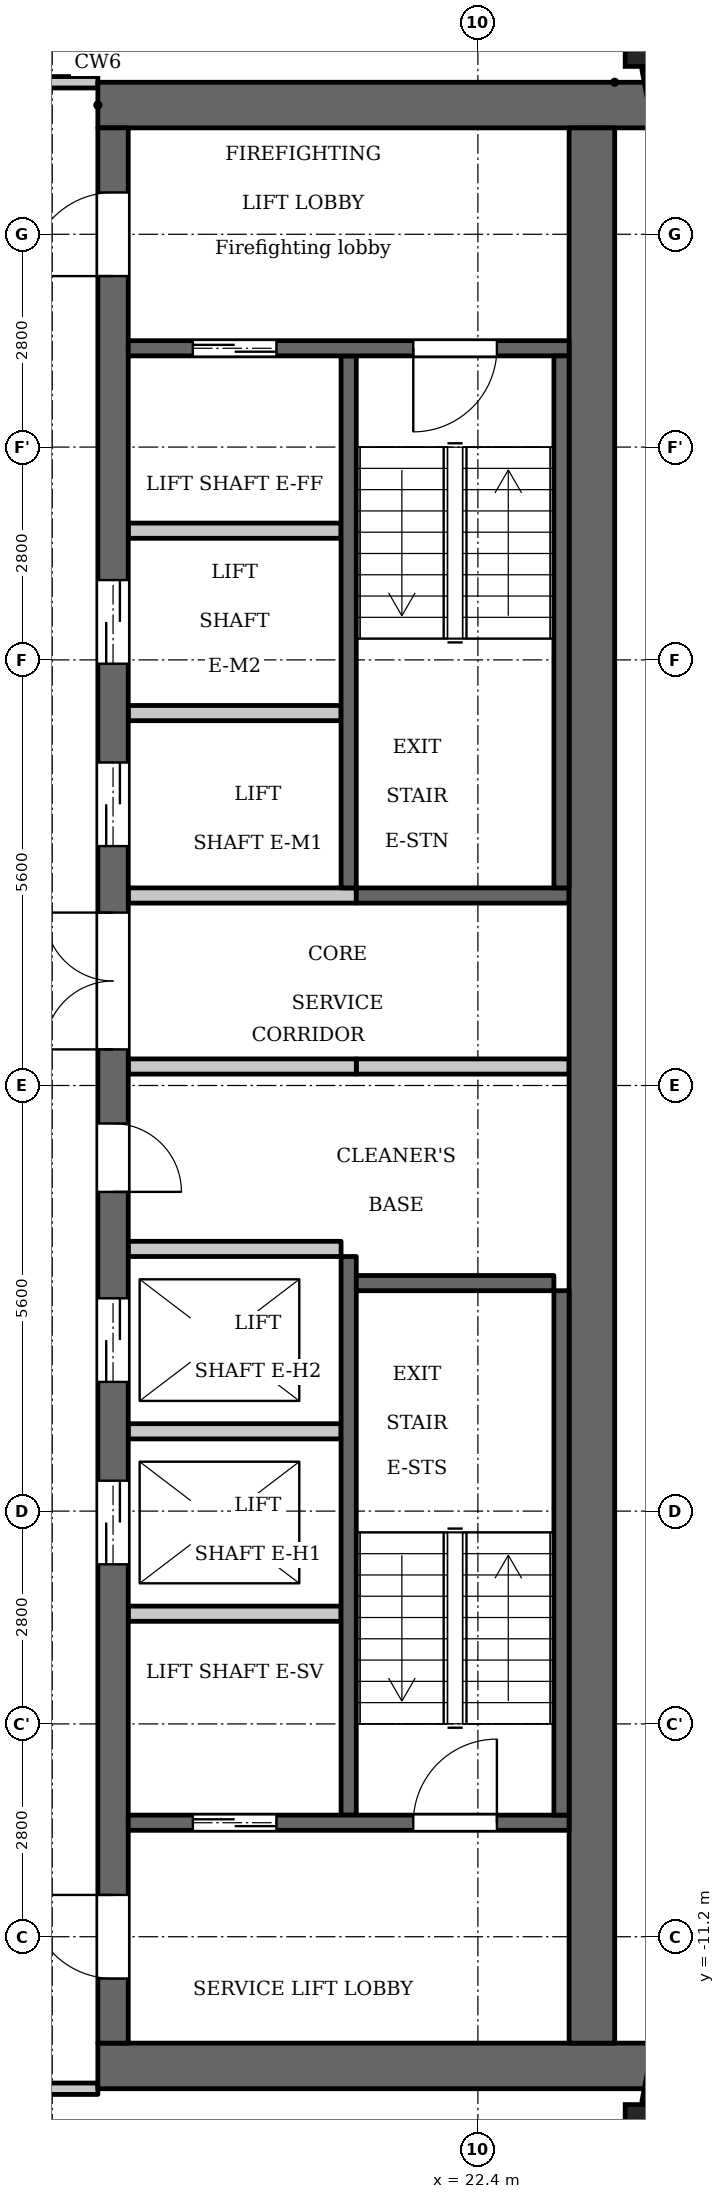
"""IFC4 building model, lengths in metres.
Left out: names, types, materials, properties, quantities, classifications, styles, units other than length and angle.
Written with IfcOpenShell. Run it as: python <this file> out.ifc"""

import sys

from ifc_helpers import new_model, si_unit, direction, frame, frame_2d, origin, origin_2d, place, context, subcontext, project, spatial, rectangle, extrude, element, fill, save


model = new_model("IFC4")
c1 = context("Model", 3, precision=1e-05, world=origin(), true_north=direction((0.0, 1.0)))
c2 = subcontext(c1, "Body", "Model", "MODEL_VIEW")
j1 = project(units=[si_unit("LENGTHUNIT", "METRE"), si_unit("PLANEANGLEUNIT", "RADIAN")], contexts=[c1])
p1 = place(None, origin())
s1 = spatial("IfcSite", under=j1, at=p1, CompositionType="ELEMENT")
p2 = place(p1, origin())
s2 = spatial("IfcBuilding", under=s1, at=p2, CompositionType="ELEMENT")
p3 = place(p2, frame((0.0, 0.0, 241.7)))
s3 = spatial("IfcBuildingStorey", under=s2, at=p3, CompositionType="ELEMENT", Elevation=241.7)
for number, where, z_axis, x_axis in (
    (1, (24.738, -13.809, 0.0), (0.0, 0.0, 1.0), (1.0, 0.0, 0.0)),
    (2, (24.738, 13.809, 0.0), (0.0, 0.0, 1.0), (1.0, 0.0, 0.0)),
):
    element("IfcColumn", number, at=place(p3, frame(where, z_axis=z_axis, x_axis=x_axis)), inside=s3, PredefinedType="COLUMN", context=c2, shape_type="SweptSolid", body=[
        extrude(rectangle(XDim=0.8, YDim=0.8, at=origin_2d()), origin(), (0.0, 0.0, 1.0), 3.5),
    ])
for number, where, z_axis, x_axis in (
    (3, (24.705, -13.395, 0.0), (0.0, 0.0, 1.0), (0.187, 0.982, 0.0)),
    (4, (25.053, 11.572, 0.0), (0.0, 0.0, 1.0), (-0.187, 0.982, 0.0)),
):
    element("IfcWall", number, at=place(p3, frame(where, z_axis=z_axis, x_axis=x_axis)), inside=s3, PredefinedType="SOLIDWALL", context=c2, shape_type="SweptSolid", body=[
        extrude(rectangle(XDim=1.856, YDim=0.3, at=frame_2d((0.928, 0.0))), origin(), (0.0, 0.0, 1.0), 2.55),
    ])
p4 = place(p3, frame((20.7, 2.6, 0.0), z_axis=(0.0, 0.0, 1.0), x_axis=(0.0, 1.0, 0.0)))
e5 = element("IfcWall", 5, at=p4, inside=s3, PredefinedType="SHEAR", context=c2, shape_type="SweptSolid", body=[
    extrude(rectangle(XDim=7.0, YDim=0.2, at=frame_2d((3.5, 0.0))), origin(), (0.0, 0.0, 1.0), 3.2),
])
p5 = place(p3, frame((20.7, -9.6, 0.0), z_axis=(0.0, 0.0, 1.0), x_axis=(0.0, 1.0, 0.0)))
e6 = element("IfcWall", 6, at=p5, inside=s3, PredefinedType="SHEAR", context=c2, shape_type="SweptSolid", body=[
    extrude(rectangle(XDim=7.35, YDim=0.2, at=frame_2d((3.675, 0.0))), origin(), (0.0, 0.0, 1.0), 3.2),
])
p6 = place(p3, frame((20.8, 2.5, 0.0), z_axis=(0.0, 0.0, 1.0), x_axis=(1.0, 0.0, 0.0)))
e7 = element("IfcWall", 7, at=p6, inside=s3, PredefinedType="SHEAR", context=c2, shape_type="SweptSolid", body=[
    extrude(rectangle(XDim=2.8, YDim=0.2, at=frame_2d((1.4, 0.0))), origin(), (0.0, 0.0, 1.0), 3.2),
])
p7 = place(p3, frame((20.8, 0.25, 0.0), z_axis=(0.0, 0.0, 1.0), x_axis=(1.0, 0.0, 0.0)))
e8 = element("IfcWall", 8, at=p7, inside=s3, PredefinedType="PARTITIONING", context=c2, shape_type="SweptSolid", body=[
    extrude(rectangle(XDim=2.8, YDim=0.2, at=frame_2d((1.4, 0.0))), origin(), (0.0, 0.0, 1.0), 3.2),
])
for number, where, z_axis, x_axis in (
    (9, (17.4, 12.9, 0.0), (0.0, 0.0, 1.0), (1.0, 0.0, 0.0)),
    (10, (17.4, -12.9, 0.0), (0.0, 0.0, 1.0), (1.0, 0.0, 0.0)),
):
    element("IfcWall", number, at=place(p3, frame(where, z_axis=z_axis, x_axis=x_axis)), inside=s3, PredefinedType="SHEAR", context=c2, shape_type="SweptSolid", body=[
        extrude(rectangle(XDim=7.32, YDim=0.6, at=frame_2d((3.66, 0.0))), origin(), (0.0, 0.0, 1.0), 3.2),
    ])
p8 = place(p3, frame((17.6, -12.6, 0.0), z_axis=(0.0, 0.0, 1.0), x_axis=(0.0, 1.0, 0.0)))
e11 = element("IfcWall", 11, at=p8, inside=s3, PredefinedType="SHEAR", context=c2, shape_type="SweptSolid", body=[
    extrude(rectangle(XDim=25.2, YDim=0.4, at=frame_2d((12.6, 0.0))), origin(), (0.0, 0.0, 1.0), 3.2),
])
p9 = place(p8, frame((6.3, 0.0, 0.0)))
e12 = element("IfcOpeningElement", 12, at=p9, cuts=e11, PredefinedType="OPENING", context=c2, shape_type="SweptSolid", body=[
    extrude(rectangle(XDim=1.1, YDim=2.1, at=frame_2d((0.55, 1.05))), frame((0.0, 0.21, 0.0), z_axis=(0.0, -1.0, 0.0), x_axis=(1.0, 0.0, 0.0)), (0.0, 0.0, 1.0), 0.42),
])
p10 = place(p8, frame((8.7, 0.0, 0.0)))
e13 = element("IfcOpeningElement", 13, at=p10, cuts=e11, PredefinedType="OPENING", context=c2, shape_type="SweptSolid", body=[
    extrude(rectangle(XDim=1.1, YDim=2.1, at=frame_2d((0.55, 1.05))), frame((0.0, 0.21, 0.0), z_axis=(0.0, -1.0, 0.0), x_axis=(1.0, 0.0, 0.0)), (0.0, 0.0, 1.0), 0.42),
])
p11 = place(p8, frame((11.2, 0.0, 0.0)))
e14 = element("IfcOpeningElement", 14, at=p11, cuts=e11, PredefinedType="OPENING", context=c2, shape_type="SweptSolid", body=[
    extrude(rectangle(XDim=0.9, YDim=2.1, at=frame_2d((0.45, 1.05))), frame((0.0, 0.21, 0.0), z_axis=(0.0, -1.0, 0.0), x_axis=(1.0, 0.0, 0.0)), (0.0, 0.0, 1.0), 0.42),
])
p12 = place(p8, frame((15.75, 0.0, 0.0)))
e15 = element("IfcOpeningElement", 15, at=p12, cuts=e11, PredefinedType="OPENING", context=c2, shape_type="SweptSolid", body=[
    extrude(rectangle(XDim=1.1, YDim=2.1, at=frame_2d((0.55, 1.05))), frame((0.0, 0.21, 0.0), z_axis=(0.0, -1.0, 0.0), x_axis=(1.0, 0.0, 0.0)), (0.0, 0.0, 1.0), 0.42),
])
p13 = place(p8, frame((18.15, 0.0, 0.0)))
e16 = element("IfcOpeningElement", 16, at=p13, cuts=e11, PredefinedType="OPENING", context=c2, shape_type="SweptSolid", body=[
    extrude(rectangle(XDim=1.1, YDim=2.1, at=frame_2d((0.55, 1.05))), frame((0.0, 0.21, 0.0), z_axis=(0.0, -1.0, 0.0), x_axis=(1.0, 0.0, 0.0)), (0.0, 0.0, 1.0), 0.42),
])
p14 = place(p8, frame((23.25, 0.0, 0.0)))
e17 = element("IfcOpeningElement", 17, at=p14, cuts=e11, PredefinedType="OPENING", context=c2, shape_type="SweptSolid", body=[
    extrude(rectangle(XDim=1.1, YDim=2.1, at=frame_2d((0.55, 1.05))), frame((0.0, 0.21, 0.0), z_axis=(0.0, -1.0, 0.0), x_axis=(1.0, 0.0, 0.0)), (0.0, 0.0, 1.0), 0.42),
])
p15 = place(p8, frame((0.85, 0.0, 0.0)))
e18 = element("IfcOpeningElement", 18, at=p15, cuts=e11, PredefinedType="OPENING", context=c2, shape_type="SweptSolid", body=[
    extrude(rectangle(XDim=1.1, YDim=2.1, at=frame_2d((0.55, 1.05))), frame((0.0, 0.21, 0.0), z_axis=(0.0, -1.0, 0.0), x_axis=(1.0, 0.0, 0.0)), (0.0, 0.0, 1.0), 0.42),
])
p16 = place(p8, frame((13.075, 0.0, 0.0)))
e19 = element("IfcOpeningElement", 19, at=p16, cuts=e11, PredefinedType="OPENING", context=c2, shape_type="SweptSolid", body=[
    extrude(rectangle(XDim=1.8, YDim=2.1, at=frame_2d((0.9, 1.05))), frame((0.0, 0.21, 0.0), z_axis=(0.0, -1.0, 0.0), x_axis=(1.0, 0.0, 0.0)), (0.0, 0.0, 1.0), 0.42),
])
p17 = place(p3, frame((23.9, -12.6, 0.0), z_axis=(0.0, 0.0, 1.0), x_axis=(0.0, 1.0, 0.0)))
e20 = element("IfcWall", 20, at=p17, inside=s3, PredefinedType="SHEAR", context=c2, shape_type="SweptSolid", body=[
    extrude(rectangle(XDim=25.2, YDim=0.6, at=frame_2d((12.6, 0.0))), origin(), (0.0, 0.0, 1.0), 3.2),
])
p18 = place(p3, frame((17.8, -9.7, 0.0), z_axis=(0.0, 0.0, 1.0), x_axis=(1.0, 0.0, 0.0)))
e21 = element("IfcWall", 21, at=p18, inside=s3, PredefinedType="SHEAR", context=c2, shape_type="SweptSolid", body=[
    extrude(rectangle(XDim=5.8, YDim=0.2, at=frame_2d((2.9, 0.0))), origin(), (0.0, 0.0, 1.0), 3.2),
])
p19 = place(p18, frame((0.85, 0.0, 0.0)))
e22 = element("IfcOpeningElement", 22, at=p19, cuts=e21, PredefinedType="OPENING", context=c2, shape_type="SweptSolid", body=[
    extrude(rectangle(XDim=1.1, YDim=2.1, at=frame_2d((0.55, 1.05))), frame((0.0, 0.11, 0.0), z_axis=(0.0, -1.0, 0.0), x_axis=(1.0, 0.0, 0.0)), (0.0, 0.0, 1.0), 0.22),
])
p20 = place(p18, frame((3.75, 0.0, 0.0)))
e23 = element("IfcOpeningElement", 23, at=p20, cuts=e21, PredefinedType="OPENING", context=c2, shape_type="SweptSolid", body=[
    extrude(rectangle(XDim=1.1, YDim=2.1, at=frame_2d((0.55, 1.05))), frame((0.0, 0.11, 0.0), z_axis=(0.0, -1.0, 0.0), x_axis=(1.0, 0.0, 0.0)), (0.0, 0.0, 1.0), 0.22),
])
for number, where, z_axis, x_axis in (
    (24, (17.8, -6.95, 0.0), (0.0, 0.0, 1.0), (1.0, 0.0, 0.0)),
    (25, (17.8, -4.55, 0.0), (0.0, 0.0, 1.0), (1.0, 0.0, 0.0)),
    (26, (17.8, -2.15, 0.0), (0.0, 0.0, 1.0), (1.0, 0.0, 0.0)),
):
    element("IfcWall", number, at=place(p3, frame(where, z_axis=z_axis, x_axis=x_axis)), inside=s3, PredefinedType="PARTITIONING", context=c2, shape_type="SweptSolid", body=[
        extrude(rectangle(XDim=2.8, YDim=0.2, at=frame_2d((1.4, 0.0))), origin(), (0.0, 0.0, 1.0), 3.2),
    ])
for number, where, z_axis, x_axis in (
    (27, (17.8, 0.25, 0.0), (0.0, 0.0, 1.0), (1.0, 0.0, 0.0)),
    (28, (17.8, 2.5, 0.0), (0.0, 0.0, 1.0), (1.0, 0.0, 0.0)),
):
    element("IfcWall", number, at=place(p3, frame(where, z_axis=z_axis, x_axis=x_axis)), inside=s3, PredefinedType="PARTITIONING", context=c2, shape_type="SweptSolid", body=[
        extrude(rectangle(XDim=3.0, YDim=0.2, at=frame_2d((1.5, 0.0))), origin(), (0.0, 0.0, 1.0), 3.2),
    ])
for number, where, z_axis, x_axis in (
    (29, (17.8, 4.9, 0.0), (0.0, 0.0, 1.0), (1.0, 0.0, 0.0)),
    (30, (17.8, 7.3, 0.0), (0.0, 0.0, 1.0), (1.0, 0.0, 0.0)),
):
    element("IfcWall", number, at=place(p3, frame(where, z_axis=z_axis, x_axis=x_axis)), inside=s3, PredefinedType="PARTITIONING", context=c2, shape_type="SweptSolid", body=[
        extrude(rectangle(XDim=2.8, YDim=0.2, at=frame_2d((1.4, 0.0))), origin(), (0.0, 0.0, 1.0), 3.2),
    ])
p21 = place(p3, frame((17.8, 9.7, 0.0), z_axis=(0.0, 0.0, 1.0), x_axis=(1.0, 0.0, 0.0)))
e31 = element("IfcWall", 31, at=p21, inside=s3, PredefinedType="SHEAR", context=c2, shape_type="SweptSolid", body=[
    extrude(rectangle(XDim=5.8, YDim=0.2, at=frame_2d((2.9, 0.0))), origin(), (0.0, 0.0, 1.0), 3.2),
])
p22 = place(p21, frame((0.85, 0.0, 0.0)))
e32 = element("IfcOpeningElement", 32, at=p22, cuts=e31, PredefinedType="OPENING", context=c2, shape_type="SweptSolid", body=[
    extrude(rectangle(XDim=1.1, YDim=2.1, at=frame_2d((0.55, 1.05))), frame((0.0, 0.11, 0.0), z_axis=(0.0, -1.0, 0.0), x_axis=(1.0, 0.0, 0.0)), (0.0, 0.0, 1.0), 0.22),
])
p23 = place(p21, frame((3.75, 0.0, 0.0)))
e33 = element("IfcOpeningElement", 33, at=p23, cuts=e31, PredefinedType="OPENING", context=c2, shape_type="SweptSolid", body=[
    extrude(rectangle(XDim=1.1, YDim=2.1, at=frame_2d((0.55, 1.05))), frame((0.0, 0.11, 0.0), z_axis=(0.0, -1.0, 0.0), x_axis=(1.0, 0.0, 0.0)), (0.0, 0.0, 1.0), 0.22),
])
p24 = place(p3, frame((23.5, 2.6, 0.0), z_axis=(0.0, 0.0, 1.0), x_axis=(0.0, 1.0, 0.0)))
e34 = element("IfcWall", 34, at=p24, inside=s3, PredefinedType="SHEAR", context=c2, shape_type="SweptSolid", body=[
    extrude(rectangle(XDim=7.0, YDim=0.2, at=frame_2d((3.5, 0.0))), origin(), (0.0, 0.0, 1.0), 3.2),
])
p25 = place(p3, frame((23.5, -9.6, 0.0), z_axis=(0.0, 0.0, 1.0), x_axis=(0.0, 1.0, 0.0)))
e35 = element("IfcWall", 35, at=p25, inside=s3, PredefinedType="SHEAR", context=c2, shape_type="SweptSolid", body=[
    extrude(rectangle(XDim=6.9, YDim=0.2, at=frame_2d((3.45, 0.0))), origin(), (0.0, 0.0, 1.0), 3.2),
])
p26 = place(p3, frame((20.8, -2.6, 0.0), z_axis=(0.0, 0.0, 1.0), x_axis=(1.0, 0.0, 0.0)))
e36 = element("IfcWall", 36, at=p26, inside=s3, PredefinedType="SHEAR", context=c2, shape_type="SweptSolid", body=[
    extrude(rectangle(XDim=2.6, YDim=0.2, at=frame_2d((1.3, 0.0))), origin(), (0.0, 0.0, 1.0), 3.2),
])
p27 = place(p3, frame((15.075, -13.2, 0.0), z_axis=(0.0, 0.0, 1.0), x_axis=(1.0, 0.0, 0.0)))
e37 = element("IfcWall", 37, at=p27, inside=s3, PredefinedType="PARTITIONING", context=c2, shape_type="SweptSolid", body=[
    extrude(rectangle(XDim=2.325, YDim=0.15, at=frame_2d((1.163, 0.0))), origin(), (0.0, 0.0, 1.0), 3.2),
])
p28 = place(p27, frame((0.575, 0.0, 0.0)))
e38 = element("IfcOpeningElement", 38, at=p28, cuts=e37, PredefinedType="OPENING", context=c2, shape_type="SweptSolid", body=[
    extrude(rectangle(XDim=1.0, YDim=2.1, at=frame_2d((0.5, 1.05))), frame((0.0, 0.085, 0.0), z_axis=(0.0, -1.0, 0.0), x_axis=(1.0, 0.0, 0.0)), (0.0, 0.0, 1.0), 0.17),
])
p29 = place(p3, frame((15.075, 13.2, 0.0), z_axis=(0.0, 0.0, 1.0), x_axis=(1.0, 0.0, 0.0)))
e39 = element("IfcWall", 39, at=p29, inside=s3, PredefinedType="PARTITIONING", context=c2, shape_type="SweptSolid", body=[
    extrude(rectangle(XDim=2.325, YDim=0.15, at=frame_2d((1.163, 0.0))), origin(), (0.0, 0.0, 1.0), 3.2),
])
p30 = place(p29, frame((0.675, 0.0, 0.0)))
e40 = element("IfcOpeningElement", 40, at=p30, cuts=e39, PredefinedType="OPENING", context=c2, shape_type="SweptSolid", body=[
    extrude(rectangle(XDim=1.0, YDim=2.1, at=frame_2d((0.5, 1.05))), frame((0.0, 0.085, 0.0), z_axis=(0.0, -1.0, 0.0), x_axis=(1.0, 0.0, 0.0)), (0.0, 0.0, 1.0), 0.17),
])
p31 = place(p19, origin())
e41 = element("IfcDoor", 41, at=p31, inside=s3, OperationType="DOUBLE_DOOR_SLIDING", PredefinedType="DOOR", context=c2, shape_type="SweptSolid", body=[
    extrude(rectangle(XDim=1.1, YDim=2.1, at=frame_2d((0.55, 1.05))), frame((0.0, 0.025, 0.0), z_axis=(0.0, -1.0, 0.0), x_axis=(1.0, 0.0, 0.0)), (0.0, 0.0, 1.0), 0.05),
])
fill(e22, e41)
p32 = place(p9, origin())
e42 = element("IfcDoor", 42, at=p32, inside=s3, OperationType="DOUBLE_DOOR_SLIDING", PredefinedType="DOOR", context=c2, shape_type="SweptSolid", body=[
    extrude(rectangle(XDim=1.1, YDim=2.1, at=frame_2d((0.55, 1.05))), frame((0.0, 0.025, 0.0), z_axis=(0.0, -1.0, 0.0), x_axis=(1.0, 0.0, 0.0)), (0.0, 0.0, 1.0), 0.05),
])
fill(e12, e42)
p33 = place(p10, origin())
e43 = element("IfcDoor", 43, at=p33, inside=s3, OperationType="DOUBLE_DOOR_SLIDING", PredefinedType="DOOR", context=c2, shape_type="SweptSolid", body=[
    extrude(rectangle(XDim=1.1, YDim=2.1, at=frame_2d((0.55, 1.05))), frame((0.0, 0.025, 0.0), z_axis=(0.0, -1.0, 0.0), x_axis=(1.0, 0.0, 0.0)), (0.0, 0.0, 1.0), 0.05),
])
fill(e13, e43)
p34 = place(p11, origin())
e44 = element("IfcDoor", 44, at=p34, inside=s3, OperationType="SINGLE_SWING_LEFT", PredefinedType="DOOR", context=c2, shape_type="SweptSolid", body=[
    extrude(rectangle(XDim=0.9, YDim=2.1, at=frame_2d((0.45, 1.05))), frame((0.0, 0.025, 0.0), z_axis=(0.0, -1.0, 0.0), x_axis=(1.0, 0.0, 0.0)), (0.0, 0.0, 1.0), 0.05),
])
fill(e14, e44)
p35 = place(p12, origin())
e45 = element("IfcDoor", 45, at=p35, inside=s3, OperationType="DOUBLE_DOOR_SLIDING", PredefinedType="DOOR", context=c2, shape_type="SweptSolid", body=[
    extrude(rectangle(XDim=1.1, YDim=2.1, at=frame_2d((0.55, 1.05))), frame((0.0, 0.025, 0.0), z_axis=(0.0, -1.0, 0.0), x_axis=(1.0, 0.0, 0.0)), (0.0, 0.0, 1.0), 0.05),
])
fill(e15, e45)
p36 = place(p13, origin())
e46 = element("IfcDoor", 46, at=p36, inside=s3, OperationType="DOUBLE_DOOR_SLIDING", PredefinedType="DOOR", context=c2, shape_type="SweptSolid", body=[
    extrude(rectangle(XDim=1.1, YDim=2.1, at=frame_2d((0.55, 1.05))), frame((0.0, 0.025, 0.0), z_axis=(0.0, -1.0, 0.0), x_axis=(1.0, 0.0, 0.0)), (0.0, 0.0, 1.0), 0.05),
])
fill(e16, e46)
p37 = place(p22, origin())
e47 = element("IfcDoor", 47, at=p37, inside=s3, OperationType="DOUBLE_DOOR_SLIDING", PredefinedType="DOOR", context=c2, shape_type="SweptSolid", body=[
    extrude(rectangle(XDim=1.1, YDim=2.1, at=frame_2d((0.55, 1.05))), frame((0.0, 0.025, 0.0), z_axis=(0.0, -1.0, 0.0), x_axis=(1.0, 0.0, 0.0)), (0.0, 0.0, 1.0), 0.05),
])
fill(e32, e47)
p38 = place(p14, origin())
e48 = element("IfcDoor", 48, at=p38, inside=s3, OperationType="SINGLE_SWING_RIGHT", PredefinedType="DOOR", context=c2, shape_type="SweptSolid", body=[
    extrude(rectangle(XDim=1.1, YDim=2.1, at=frame_2d((0.55, 1.05))), frame((0.0, 0.025, 0.0), z_axis=(0.0, -1.0, 0.0), x_axis=(1.0, 0.0, 0.0)), (0.0, 0.0, 1.0), 0.05),
])
fill(e17, e48)
p39 = place(p15, origin())
e49 = element("IfcDoor", 49, at=p39, inside=s3, OperationType="SINGLE_SWING_LEFT", PredefinedType="DOOR", context=c2, shape_type="SweptSolid", body=[
    extrude(rectangle(XDim=1.1, YDim=2.1, at=frame_2d((0.55, 1.05))), frame((0.0, 0.025, 0.0), z_axis=(0.0, -1.0, 0.0), x_axis=(1.0, 0.0, 0.0)), (0.0, 0.0, 1.0), 0.05),
])
fill(e18, e49)
p40 = place(p23, origin())
e50 = element("IfcDoor", 50, at=p40, inside=s3, OperationType="SINGLE_SWING_LEFT", PredefinedType="DOOR", context=c2, shape_type="SweptSolid", body=[
    extrude(rectangle(XDim=1.1, YDim=2.1, at=frame_2d((0.55, 1.05))), frame((0.0, 0.025, 0.0), z_axis=(0.0, -1.0, 0.0), x_axis=(1.0, 0.0, 0.0)), (0.0, 0.0, 1.0), 0.05),
])
fill(e33, e50)
p41 = place(p20, origin())
e51 = element("IfcDoor", 51, at=p41, inside=s3, OperationType="SINGLE_SWING_LEFT", PredefinedType="DOOR", context=c2, shape_type="SweptSolid", body=[
    extrude(rectangle(XDim=1.1, YDim=2.1, at=frame_2d((0.55, 1.05))), frame((0.0, 0.025, 0.0), z_axis=(0.0, -1.0, 0.0), x_axis=(1.0, 0.0, 0.0)), (0.0, 0.0, 1.0), 0.05),
])
fill(e23, e51)
p42 = place(p16, origin())
e52 = element("IfcDoor", 52, at=p42, inside=s3, OperationType="DOUBLE_DOOR_SINGLE_SWING", PredefinedType="DOOR", context=c2, shape_type="SweptSolid", body=[
    extrude(rectangle(XDim=1.8, YDim=2.1, at=frame_2d((0.9, 1.05))), frame((0.0, 0.025, 0.0), z_axis=(0.0, -1.0, 0.0), x_axis=(1.0, 0.0, 0.0)), (0.0, 0.0, 1.0), 0.05),
])
fill(e19, e52)
save(model, sys.argv[1])
